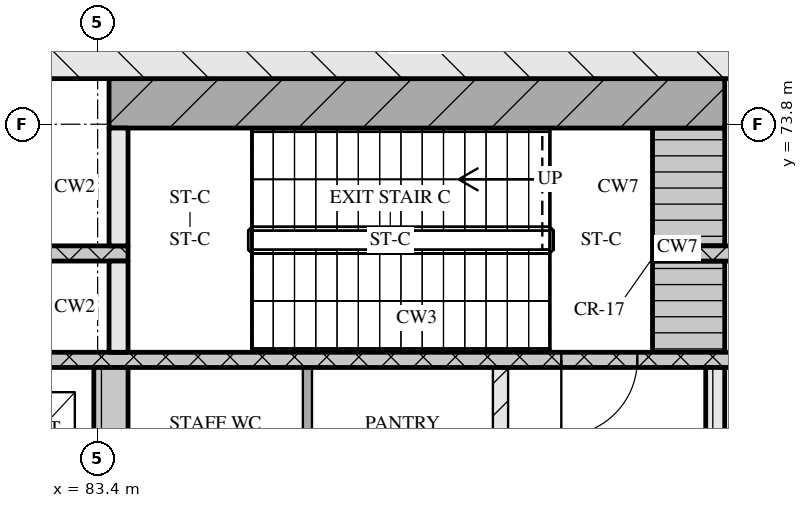
"""IFC4 building model, lengths in metres.
Left out: names, types, materials, properties, quantities, classifications, styles, units other than length and angle.
Written with IfcOpenShell. Run it as: python <this file> out.ifc"""

import sys

from ifc_helpers import new_model, si_unit, direction, frame, frame_2d, origin, place, context, subcontext, project, spatial, rectangle, extrude, element, fill, save


model = new_model("IFC4")
c1 = context("Model", 3, precision=1e-05, world=origin(), true_north=direction((0.0, 1.0)))
c2 = subcontext(c1, "Body", "Model", "MODEL_VIEW")
j1 = project(units=[si_unit("LENGTHUNIT", "METRE"), si_unit("PLANEANGLEUNIT", "RADIAN")], contexts=[c1])
p1 = place(None, origin())
s1 = spatial("IfcSite", under=j1, at=p1, CompositionType="ELEMENT")
p2 = place(p1, origin())
s2 = spatial("IfcBuilding", under=s1, at=p2, CompositionType="ELEMENT")
p3 = place(p2, frame((0.0, 0.0, 84.0)))
s3 = spatial("IfcBuildingStorey", under=s2, at=p3, CompositionType="ELEMENT", Elevation=84.0)
p4 = place(p3, frame((66.8, 74.9, 0.0), z_axis=(0.0, 0.0, 1.0), x_axis=(1.0, 0.0, 0.0)))
e1 = element("IfcWall", 1, at=p4, inside=s3, PredefinedType="SOLIDWALL", context=c2, shape_type="SweptSolid", body=[
    extrude(rectangle(XDim=41.6, YDim=1.0, at=frame_2d((20.8, 0.0))), origin(), (0.0, 0.0, 1.0), 10.97),
])
p5 = place(p3, frame((83.575, 68.0, 0.0), z_axis=(0.0, 0.0, 1.0), x_axis=(0.0, 1.0, 0.0)))
e2 = element("IfcWall", 2, at=p5, inside=s3, PredefinedType="SOLIDWALL", context=c2, shape_type="SweptSolid", body=[
    extrude(rectangle(XDim=2.6, YDim=0.45, at=frame_2d((1.3, 0.0))), origin(), (0.0, 0.0, 1.0), 10.97),
])
p6 = place(p3, frame((86.16, 68.0, 0.0), z_axis=(0.0, 0.0, 1.0), x_axis=(0.0, 1.0, 0.0)))
e3 = element("IfcWall", 3, at=p6, inside=s3, PredefinedType="PARTITIONING", context=c2, shape_type="SweptSolid", body=[
    extrude(rectangle(XDim=2.6, YDim=0.12, at=frame_2d((1.3, 0.0))), origin(), (0.0, 0.0, 1.0), 10.97),
])
p7 = place(p3, frame((88.7, 68.0, 0.0), z_axis=(0.0, 0.0, 1.0), x_axis=(0.0, 1.0, 0.0)))
e4 = element("IfcWall", 4, at=p7, inside=s3, PredefinedType="PARTITIONING", context=c2, shape_type="SweptSolid", body=[
    extrude(rectangle(XDim=2.6, YDim=0.2, at=frame_2d((1.3, 0.0))), origin(), (0.0, 0.0, 1.0), 10.97),
])
p8 = place(p3, frame((91.525, 68.0, 0.0), z_axis=(0.0, 0.0, 1.0), x_axis=(0.0, 1.0, 0.0)))
e5 = element("IfcWall", 5, at=p8, inside=s3, PredefinedType="SOLIDWALL", context=c2, shape_type="SweptSolid", body=[
    extrude(rectangle(XDim=2.6, YDim=0.25, at=frame_2d((1.3, 0.0))), origin(), (0.0, 0.0, 1.0), 10.97),
])
p9 = place(p3, frame((67.8, 70.7, 0.0), z_axis=(0.0, 0.0, 1.0), x_axis=(1.0, 0.0, 0.0)))
e6 = element("IfcWall", 6, at=p9, inside=s3, PredefinedType="SOLIDWALL", context=c2, shape_type="SweptSolid", body=[
    extrude(rectangle(XDim=39.6, YDim=0.2, at=frame_2d((19.8, 0.0))), origin(), (0.0, 0.0, 1.0), 10.97),
])
p10 = place(p9, frame((0.65, 0.0, 0.0)))
e7 = element("IfcOpeningElement", 7, at=p10, cuts=e6, PredefinedType="OPENING", context=c2, shape_type="SweptSolid", body=[
    extrude(rectangle(XDim=1.1, YDim=2.1, at=frame_2d((0.55, 1.05))), frame((0.0, 0.11, 0.0), z_axis=(0.0, -1.0, 0.0), x_axis=(1.0, 0.0, 0.0)), (0.0, 0.0, 1.0), 0.22),
])
p11 = place(p9, frame((3.25, 0.0, 0.0)))
e8 = element("IfcOpeningElement", 8, at=p11, cuts=e6, PredefinedType="OPENING", context=c2, shape_type="SweptSolid", body=[
    extrude(rectangle(XDim=1.1, YDim=2.1, at=frame_2d((0.55, 1.05))), frame((0.0, 0.11, 0.0), z_axis=(0.0, -1.0, 0.0), x_axis=(1.0, 0.0, 0.0)), (0.0, 0.0, 1.0), 0.22),
])
p12 = place(p9, frame((5.9, 0.0, 0.0)))
e9 = element("IfcOpeningElement", 9, at=p12, cuts=e6, PredefinedType="OPENING", context=c2, shape_type="SweptSolid", body=[
    extrude(rectangle(XDim=1.0, YDim=2.1, at=frame_2d((0.5, 1.05))), frame((0.0, 0.11, 0.0), z_axis=(0.0, -1.0, 0.0), x_axis=(1.0, 0.0, 0.0)), (0.0, 0.0, 1.0), 0.22),
])
p13 = place(p9, frame((21.7, 0.0, 0.0)))
e10 = element("IfcOpeningElement", 10, at=p13, cuts=e6, PredefinedType="OPENING", context=c2, shape_type="SweptSolid", body=[
    extrude(rectangle(XDim=1.0, YDim=2.1, at=frame_2d((0.5, 1.05))), frame((0.0, 0.11, 0.0), z_axis=(0.0, -1.0, 0.0), x_axis=(1.0, 0.0, 0.0)), (0.0, 0.0, 1.0), 0.22),
])
p14 = place(p9, frame((32.7, 0.0, 0.0)))
e11 = element("IfcOpeningElement", 11, at=p14, cuts=e6, PredefinedType="OPENING", context=c2, shape_type="SweptSolid", body=[
    extrude(rectangle(XDim=1.0, YDim=2.1, at=frame_2d((0.5, 1.05))), frame((0.0, 0.11, 0.0), z_axis=(0.0, -1.0, 0.0), x_axis=(1.0, 0.0, 0.0)), (0.0, 0.0, 1.0), 0.22),
])
p15 = place(p9, frame((35.25, 0.0, 0.0)))
e12 = element("IfcOpeningElement", 12, at=p15, cuts=e6, PredefinedType="OPENING", context=c2, shape_type="SweptSolid", body=[
    extrude(rectangle(XDim=1.1, YDim=2.1, at=frame_2d((0.55, 1.05))), frame((0.0, 0.11, 0.0), z_axis=(0.0, -1.0, 0.0), x_axis=(1.0, 0.0, 0.0)), (0.0, 0.0, 1.0), 0.22),
])
p16 = place(p9, frame((37.85, 0.0, 0.0)))
e13 = element("IfcOpeningElement", 13, at=p16, cuts=e6, PredefinedType="OPENING", context=c2, shape_type="SweptSolid", body=[
    extrude(rectangle(XDim=1.1, YDim=2.1, at=frame_2d((0.55, 1.05))), frame((0.0, 0.11, 0.0), z_axis=(0.0, -1.0, 0.0), x_axis=(1.0, 0.0, 0.0)), (0.0, 0.0, 1.0), 0.22),
])
p17 = place(p3, frame((83.675, 70.8, 0.0), z_axis=(0.0, 0.0, 1.0), x_axis=(0.0, 1.0, 0.0)))
e14 = element("IfcWall", 14, at=p17, inside=s3, PredefinedType="SOLIDWALL", context=c2, shape_type="SweptSolid", body=[
    extrude(rectangle(XDim=1.2, YDim=0.25, at=frame_2d((0.6, 0.0))), origin(), (0.0, 0.0, 1.0), 10.97),
])
p18 = place(p3, frame((91.175, 70.8, 0.0), z_axis=(0.0, 0.0, 1.0), x_axis=(0.0, 1.0, 0.0)))
e15 = element("IfcWall", 15, at=p18, inside=s3, PredefinedType="SOLIDWALL", context=c2, shape_type="SweptSolid", body=[
    extrude(rectangle(XDim=1.2, YDim=0.95, at=frame_2d((0.6, 0.0))), origin(), (0.0, 0.0, 1.0), 10.97),
])
p19 = place(p3, frame((72.8, 72.1, 0.0), z_axis=(0.0, 0.0, 1.0), x_axis=(1.0, 0.0, 0.0)))
e16 = element("IfcWall", 16, at=p19, inside=s3, PredefinedType="SOLIDWALL", context=c2, shape_type="SweptSolid", body=[
    extrude(rectangle(XDim=11.0, YDim=0.2, at=frame_2d((5.5, 0.0))), origin(), (0.0, 0.0, 1.0), 10.97),
])
p20 = place(p19, frame((1.25, 0.0, 0.0)))
e17 = element("IfcOpeningElement", 17, at=p20, cuts=e16, PredefinedType="OPENING", context=c2, shape_type="SweptSolid", body=[
    extrude(rectangle(XDim=0.9, YDim=2.1, at=frame_2d((0.45, 1.05))), frame((0.0, 0.11, 0.0), z_axis=(0.0, -1.0, 0.0), x_axis=(1.0, 0.0, 0.0)), (0.0, 0.0, 1.0), 0.22),
])
p21 = place(p19, frame((6.475, 0.0, 0.0)))
e18 = element("IfcOpeningElement", 18, at=p21, cuts=e16, PredefinedType="OPENING", context=c2, shape_type="SweptSolid", body=[
    extrude(rectangle(XDim=1.2, YDim=2.1, at=frame_2d((0.6, 1.05))), frame((0.0, 0.11, 0.0), z_axis=(0.0, -1.0, 0.0), x_axis=(1.0, 0.0, 0.0)), (0.0, 0.0, 1.0), 0.22),
])
p22 = place(p3, frame((90.7, 72.1, 0.0), z_axis=(0.0, 0.0, 1.0), x_axis=(1.0, 0.0, 0.0)))
e19 = element("IfcWall", 19, at=p22, inside=s3, PredefinedType="SOLIDWALL", context=c2, shape_type="SweptSolid", body=[
    extrude(rectangle(XDim=11.7, YDim=0.2, at=frame_2d((5.85, 0.0))), origin(), (0.0, 0.0, 1.0), 10.97),
])
p23 = place(p22, frame((4.025, 0.0, 0.0)))
e20 = element("IfcOpeningElement", 20, at=p23, cuts=e19, PredefinedType="OPENING", context=c2, shape_type="SweptSolid", body=[
    extrude(rectangle(XDim=1.2, YDim=2.1, at=frame_2d((0.6, 1.05))), frame((0.0, 0.11, 0.0), z_axis=(0.0, -1.0, 0.0), x_axis=(1.0, 0.0, 0.0)), (0.0, 0.0, 1.0), 0.22),
])
p24 = place(p22, frame((9.55, 0.0, 0.0)))
e21 = element("IfcOpeningElement", 21, at=p24, cuts=e19, PredefinedType="OPENING", context=c2, shape_type="SweptSolid", body=[
    extrude(rectangle(XDim=0.9, YDim=2.1, at=frame_2d((0.45, 1.05))), frame((0.0, 0.11, 0.0), z_axis=(0.0, -1.0, 0.0), x_axis=(1.0, 0.0, 0.0)), (0.0, 0.0, 1.0), 0.22),
])
p25 = place(p3, frame((83.675, 72.2, 0.0), z_axis=(0.0, 0.0, 1.0), x_axis=(0.0, 1.0, 0.0)))
e22 = element("IfcWall", 22, at=p25, inside=s3, PredefinedType="SOLIDWALL", context=c2, shape_type="SweptSolid", body=[
    extrude(rectangle(XDim=1.55, YDim=0.25, at=frame_2d((0.775, 0.0))), origin(), (0.0, 0.0, 1.0), 10.97),
])
p26 = place(p3, frame((91.175, 72.2, 0.0), z_axis=(0.0, 0.0, 1.0), x_axis=(0.0, 1.0, 0.0)))
e23 = element("IfcWall", 23, at=p26, inside=s3, PredefinedType="SOLIDWALL", context=c2, shape_type="SweptSolid", body=[
    extrude(rectangle(XDim=1.55, YDim=0.95, at=frame_2d((0.775, 0.0))), origin(), (0.0, 0.0, 1.0), 10.97),
])
p27 = place(p3, frame((83.55, 74.075, 0.0), z_axis=(0.0, 0.0, 1.0), x_axis=(1.0, 0.0, 0.0)))
e24 = element("IfcWall", 24, at=p27, inside=s3, PredefinedType="SOLIDWALL", context=c2, shape_type="SweptSolid", body=[
    extrude(rectangle(XDim=8.1, YDim=0.65, at=frame_2d((4.05, 0.0))), origin(), (0.0, 0.0, 1.0), 10.97),
])
p28 = place(p13, origin())
e25 = element("IfcDoor", 25, at=p28, inside=s3, OperationType="SINGLE_SWING_RIGHT", PredefinedType="DOOR", context=c2, shape_type="SweptSolid", body=[
    extrude(rectangle(XDim=1.0, YDim=2.1, at=frame_2d((0.5, 1.05))), frame((0.0, 0.025, 0.0), z_axis=(0.0, -1.0, 0.0), x_axis=(1.0, 0.0, 0.0)), (0.0, 0.0, 1.0), 0.05),
])
fill(e10, e25)
save(model, sys.argv[1])
